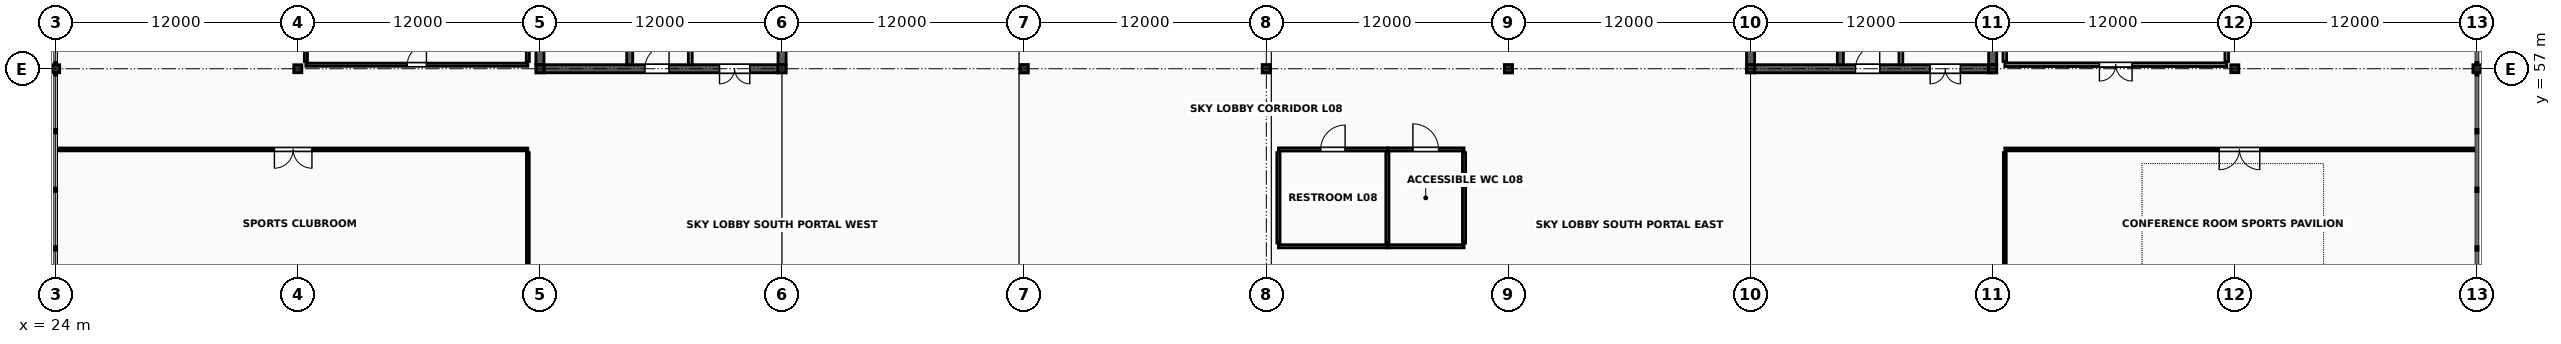
"""IFC4 building model, lengths in metres.
Left out: names, types, materials, properties, quantities, classifications, styles, units other than length and angle.
Written with IfcOpenShell. Run it as: python <this file> out.ifc"""

import sys

from ifc_helpers import new_model, si_unit, direction, frame, frame_2d, origin, origin_2d, place, context, subcontext, project, spatial, rectangle, i_section, extrude, element, fill, save


model = new_model("IFC4")
c1 = context("Model", 3, precision=1e-05, world=origin(), true_north=direction((0.0, 1.0)))
c2 = subcontext(c1, "Body", "Model", "MODEL_VIEW")
j1 = project(units=[si_unit("LENGTHUNIT", "METRE"), si_unit("PLANEANGLEUNIT", "RADIAN")], contexts=[c1])
p1 = place(None, origin())
s1 = spatial("IfcSite", under=j1, at=p1, CompositionType="ELEMENT")
p2 = place(p1, origin())
s2 = spatial("IfcBuilding", under=s1, at=p2, CompositionType="ELEMENT")
p3 = place(p2, frame((0.0, 0.0, 32.4)))
s3 = spatial("IfcBuildingStorey", under=s2, at=p3, CompositionType="ELEMENT", Elevation=32.4)
for number, where, z_axis, x_axis in (
    (1, (24.0, 57.0, 0.0), (0.0, 0.0, 1.0), (1.0, 0.0, 0.0)),
    (2, (36.0, 57.0, 0.0), (0.0, 0.0, 1.0), (1.0, 0.0, 0.0)),
):
    element("IfcColumn", number, at=place(p3, frame(where, z_axis=z_axis, x_axis=x_axis)), inside=s3, PredefinedType="COLUMN", context=c2, shape_type="SweptSolid", body=[
        extrude(i_section(OverallWidth=0.399, OverallDepth=0.393, WebThickness=0.023, FlangeThickness=0.037, FilletRadius=0.018, at=origin_2d()), origin(), (0.0, 0.0, 1.0), 5.2),
    ])
for number, where, z_axis, x_axis in (
    (3, (48.0, 57.0, 0.0), (0.0, 0.0, 1.0), (1.0, 0.0, 0.0)),
    (4, (60.0, 57.0, 0.0), (0.0, 0.0, 1.0), (1.0, 0.0, 0.0)),
    (5, (72.0, 57.0, 0.0), (0.0, 0.0, 1.0), (1.0, 0.0, 0.0)),
    (6, (84.0, 57.0, 0.0), (0.0, 0.0, 1.0), (1.0, 0.0, 0.0)),
    (7, (96.0, 57.0, 0.0), (0.0, 0.0, 1.0), (1.0, 0.0, 0.0)),
    (8, (108.0, 57.0, 0.0), (0.0, 0.0, 1.0), (1.0, 0.0, 0.0)),
    (9, (120.0, 57.0, 0.0), (0.0, 0.0, 1.0), (1.0, 0.0, 0.0)),
):
    element("IfcColumn", number, at=place(p3, frame(where, z_axis=z_axis, x_axis=x_axis)), inside=s3, PredefinedType="COLUMN", context=c2, shape_type="SweptSolid", body=[
        extrude(i_section(OverallWidth=0.406, OverallDepth=0.416, WebThickness=0.03, FlangeThickness=0.048, FilletRadius=0.018, at=origin_2d()), origin(), (0.0, 0.0, 1.0), 5.2),
    ])
for number, where, z_axis, x_axis in (
    (10, (132.0, 57.0, 0.0), (0.0, 0.0, 1.0), (1.0, 0.0, 0.0)),
    (11, (144.0, 57.0, 0.0), (0.0, 0.0, 1.0), (1.0, 0.0, 0.0)),
):
    element("IfcColumn", number, at=place(p3, frame(where, z_axis=z_axis, x_axis=x_axis)), inside=s3, PredefinedType="COLUMN", context=c2, shape_type="SweptSolid", body=[
        extrude(i_section(OverallWidth=0.399, OverallDepth=0.393, WebThickness=0.023, FlangeThickness=0.037, FilletRadius=0.018, at=origin_2d()), origin(), (0.0, 0.0, 1.0), 5.2),
    ])
p4 = place(p3, frame((48.2, 57.0, 0.0), z_axis=(0.0, 0.0, 1.0), x_axis=(1.0, 0.0, 0.0)))
e12 = element("IfcWall", 12, at=p4, inside=s3, PredefinedType="SHEAR", context=c2, shape_type="SweptSolid", body=[
    extrude(rectangle(XDim=11.6, YDim=0.4, at=frame_2d((5.8, 0.0))), origin(), (0.0, 0.0, 1.0), 5.043),
])
p5 = place(p4, frame((5.0, 0.0, 0.0)))
e13 = element("IfcOpeningElement", 13, at=p5, cuts=e12, PredefinedType="OPENING", context=c2, shape_type="SweptSolid", body=[
    extrude(rectangle(XDim=1.2, YDim=2.2, at=frame_2d((0.6, 1.1))), frame((0.0, 0.215, 0.0), z_axis=(0.0, -1.0, 0.0), x_axis=(1.0, 0.0, 0.0)), (0.0, 0.0, 1.0), 0.43),
])
p6 = place(p4, frame((8.7, 0.0, 0.0)))
e14 = element("IfcOpeningElement", 14, at=p6, cuts=e12, PredefinedType="OPENING", context=c2, shape_type="SweptSolid", body=[
    extrude(rectangle(XDim=1.5, YDim=2.25, at=frame_2d((0.75, 1.125))), frame((0.0, 0.215, 0.0), z_axis=(0.0, -1.0, 0.0), x_axis=(1.0, 0.0, 0.0)), (0.0, 0.0, 1.0), 0.43),
])
for number, where, z_axis, x_axis in (
    (15, (48.0, 57.205, 0.0), (0.0, 0.0, 1.0), (0.0, 1.0, 0.0)),
    (16, (60.0, 57.205, 0.0), (0.0, 0.0, 1.0), (0.0, 1.0, 0.0)),
):
    element("IfcWall", number, at=place(p3, frame(where, z_axis=z_axis, x_axis=x_axis)), inside=s3, PredefinedType="SHEAR", context=c2, shape_type="SweptSolid", body=[
        extrude(rectangle(XDim=11.59, YDim=0.4, at=frame_2d((5.795, 0.0))), origin(), (0.0, 0.0, 1.0), 5.043),
    ])
p7 = place(p3, frame((52.45, 57.197, 0.0), z_axis=(0.0, 0.0, 1.0), x_axis=(0.0, 1.0, 0.0)))
e17 = element("IfcWall", 17, at=p7, inside=s3, PredefinedType="SHEAR", context=c2, shape_type="SweptSolid", body=[
    extrude(rectangle(XDim=11.606, YDim=0.3, at=frame_2d((5.803, 0.0))), origin(), (0.0, 0.0, 1.0), 5.043),
])
p8 = place(p7, frame((0.9, 0.0, 0.0)))
e18 = element("IfcOpeningElement", 18, at=p8, cuts=e17, PredefinedType="OPENING", context=c2, shape_type="SweptSolid", body=[
    extrude(rectangle(XDim=1.1, YDim=2.2, at=frame_2d((0.55, 1.1))), frame((0.0, 0.165, 0.0), z_axis=(0.0, -1.0, 0.0), x_axis=(1.0, 0.0, 0.0)), (0.0, 0.0, 1.0), 0.33),
])
p9 = place(p3, frame((55.45, 57.2, 0.0), z_axis=(0.0, 0.0, 1.0), x_axis=(0.0, 1.0, 0.0)))
e19 = element("IfcWall", 19, at=p9, inside=s3, PredefinedType="SOLIDWALL", context=c2, shape_type="SweptSolid", body=[
    extrude(rectangle(XDim=8.48, YDim=0.19, at=frame_2d((4.24, 0.0))), origin(), (0.0, 0.0, 1.0), 5.033),
])
p10 = place(p9, frame((3.6, 0.0, 0.0)))
e20 = element("IfcOpeningElement", 20, at=p10, cuts=e19, PredefinedType="OPENING", context=c2, shape_type="SweptSolid", body=[
    extrude(rectangle(XDim=1.04, YDim=2.18, at=frame_2d((0.52, 1.09))), frame((0.0, 0.11, 0.0), z_axis=(0.0, -1.0, 0.0), x_axis=(1.0, 0.0, 0.0)), (0.0, 0.0, 1.0), 0.22),
])
p11 = place(p3, frame((108.2, 57.0, 0.0), z_axis=(0.0, 0.0, 1.0), x_axis=(1.0, 0.0, 0.0)))
e21 = element("IfcWall", 21, at=p11, inside=s3, PredefinedType="SHEAR", context=c2, shape_type="SweptSolid", body=[
    extrude(rectangle(XDim=11.6, YDim=0.4, at=frame_2d((5.8, 0.0))), origin(), (0.0, 0.0, 1.0), 5.043),
])
p12 = place(p11, frame((5.0, 0.0, 0.0)))
e22 = element("IfcOpeningElement", 22, at=p12, cuts=e21, PredefinedType="OPENING", context=c2, shape_type="SweptSolid", body=[
    extrude(rectangle(XDim=1.2, YDim=2.2, at=frame_2d((0.6, 1.1))), frame((0.0, 0.215, 0.0), z_axis=(0.0, -1.0, 0.0), x_axis=(1.0, 0.0, 0.0)), (0.0, 0.0, 1.0), 0.43),
])
p13 = place(p11, frame((8.7, 0.0, 0.0)))
e23 = element("IfcOpeningElement", 23, at=p13, cuts=e21, PredefinedType="OPENING", context=c2, shape_type="SweptSolid", body=[
    extrude(rectangle(XDim=1.5, YDim=2.25, at=frame_2d((0.75, 1.125))), frame((0.0, 0.215, 0.0), z_axis=(0.0, -1.0, 0.0), x_axis=(1.0, 0.0, 0.0)), (0.0, 0.0, 1.0), 0.43),
])
for number, where, z_axis, x_axis in (
    (24, (108.0, 57.205, 0.0), (0.0, 0.0, 1.0), (0.0, 1.0, 0.0)),
    (25, (120.0, 57.205, 0.0), (0.0, 0.0, 1.0), (0.0, 1.0, 0.0)),
):
    element("IfcWall", number, at=place(p3, frame(where, z_axis=z_axis, x_axis=x_axis)), inside=s3, PredefinedType="SHEAR", context=c2, shape_type="SweptSolid", body=[
        extrude(rectangle(XDim=11.59, YDim=0.4, at=frame_2d((5.795, 0.0))), origin(), (0.0, 0.0, 1.0), 5.043),
    ])
p14 = place(p3, frame((112.45, 57.197, 0.0), z_axis=(0.0, 0.0, 1.0), x_axis=(0.0, 1.0, 0.0)))
e26 = element("IfcWall", 26, at=p14, inside=s3, PredefinedType="SHEAR", context=c2, shape_type="SweptSolid", body=[
    extrude(rectangle(XDim=11.606, YDim=0.3, at=frame_2d((5.803, 0.0))), origin(), (0.0, 0.0, 1.0), 5.043),
])
p15 = place(p14, frame((0.9, 0.0, 0.0)))
e27 = element("IfcOpeningElement", 27, at=p15, cuts=e26, PredefinedType="OPENING", context=c2, shape_type="SweptSolid", body=[
    extrude(rectangle(XDim=1.1, YDim=2.2, at=frame_2d((0.55, 1.1))), frame((0.0, 0.165, 0.0), z_axis=(0.0, -1.0, 0.0), x_axis=(1.0, 0.0, 0.0)), (0.0, 0.0, 1.0), 0.33),
])
p16 = place(p3, frame((115.45, 57.2, 0.0), z_axis=(0.0, 0.0, 1.0), x_axis=(0.0, 1.0, 0.0)))
e28 = element("IfcWall", 28, at=p16, inside=s3, PredefinedType="SOLIDWALL", context=c2, shape_type="SweptSolid", body=[
    extrude(rectangle(XDim=8.48, YDim=0.19, at=frame_2d((4.24, 0.0))), origin(), (0.0, 0.0, 1.0), 5.033),
])
p17 = place(p16, frame((3.6, 0.0, 0.0)))
e29 = element("IfcOpeningElement", 29, at=p17, cuts=e28, PredefinedType="OPENING", context=c2, shape_type="SweptSolid", body=[
    extrude(rectangle(XDim=1.04, YDim=2.18, at=frame_2d((0.52, 1.09))), frame((0.0, 0.11, 0.0), z_axis=(0.0, -1.0, 0.0), x_axis=(1.0, 0.0, 0.0)), (0.0, 0.0, 1.0), 0.22),
])
p18 = place(p3, frame((24.14, 53.0, 0.0), z_axis=(0.0, 0.0, 1.0), x_axis=(1.0, 0.0, 0.0)))
e30 = element("IfcWall", 30, at=p18, inside=s3, PredefinedType="PARTITIONING", context=c2, shape_type="SweptSolid", body=[
    extrude(rectangle(XDim=23.26, YDim=0.14, at=frame_2d((11.63, 0.0))), origin(), (0.0, 0.0, 1.0), 2.88),
])
p19 = place(p18, frame((10.7, 0.0, 0.0)))
e31 = element("IfcOpeningElement", 31, at=p19, cuts=e30, PredefinedType="OPENING", context=c2, shape_type="SweptSolid", body=[
    extrude(rectangle(XDim=1.86, YDim=2.41, at=frame_2d((0.93, 1.205))), frame((0.0, 0.085, 0.0), z_axis=(0.0, -1.0, 0.0), x_axis=(1.0, 0.0, 0.0)), (0.0, 0.0, 1.0), 0.17),
])
p20 = place(p3, frame((47.4, 45.14, 0.0), z_axis=(0.0, 0.0, 1.0), x_axis=(0.0, 1.0, 0.0)))
e32 = element("IfcWall", 32, at=p20, inside=s3, PredefinedType="PARTITIONING", context=c2, shape_type="SweptSolid", body=[
    extrude(rectangle(XDim=7.7, YDim=0.14, at=frame_2d((3.85, 0.0))), origin(), (0.0, 0.0, 1.0), 2.88),
])
p21 = place(p3, frame((36.4, 57.2, 0.0), z_axis=(0.0, 0.0, 1.0), x_axis=(1.0, 0.0, 0.0)))
e33 = element("IfcWall", 33, at=p21, inside=s3, PredefinedType="PLUMBINGWALL", context=c2, shape_type="SweptSolid", body=[
    extrude(rectangle(XDim=11.0, YDim=0.155, at=frame_2d((5.5, 0.0))), origin(), (0.0, 0.0, 1.0), 2.88),
])
p22 = place(p21, frame((5.025, 0.0, 0.0)))
e34 = element("IfcOpeningElement", 34, at=p22, cuts=e33, PredefinedType="OPENING", context=c2, shape_type="SweptSolid", body=[
    extrude(rectangle(XDim=0.95, YDim=2.13, at=frame_2d((0.475, 1.065))), frame((0.0, 0.093, 0.0), z_axis=(0.0, -1.0, 0.0), x_axis=(1.0, 0.0, 0.0)), (0.0, 0.0, 1.0), 0.185),
])
for number, where, z_axis, x_axis in (
    (35, (36.4, 57.36, 0.0), (0.0, 0.0, 1.0), (0.0, 1.0, 0.0)),
    (36, (47.4, 57.36, 0.0), (0.0, 0.0, 1.0), (0.0, 1.0, 0.0)),
):
    element("IfcWall", number, at=place(p3, frame(where, z_axis=z_axis, x_axis=x_axis)), inside=s3, PredefinedType="PLUMBINGWALL", context=c2, shape_type="SweptSolid", body=[
        extrude(rectangle(XDim=11.5, YDim=0.155, at=frame_2d((5.75, 0.0))), origin(), (0.0, 0.0, 1.0), 2.88),
    ])
p23 = place(p3, frame((120.6, 57.2, 0.0), z_axis=(0.0, 0.0, 1.0), x_axis=(1.0, 0.0, 0.0)))
e37 = element("IfcWall", 37, at=p23, inside=s3, PredefinedType="SOLIDWALL", context=c2, shape_type="SweptSolid", body=[
    extrude(rectangle(XDim=11.0, YDim=0.18, at=frame_2d((5.5, 0.0))), origin(), (0.0, 0.0, 1.0), 2.88),
])
p24 = place(p23, frame((4.69, 0.0, 0.0)))
e38 = element("IfcOpeningElement", 38, at=p24, cuts=e37, PredefinedType="OPENING", context=c2, shape_type="SweptSolid", body=[
    extrude(rectangle(XDim=1.62, YDim=2.3, at=frame_2d((0.81, 1.15))), frame((0.0, 0.105, 0.0), z_axis=(0.0, -1.0, 0.0), x_axis=(1.0, 0.0, 0.0)), (0.0, 0.0, 1.0), 0.21),
])
for number, where, z_axis, x_axis in (
    (39, (120.6, 57.36, 0.0), (0.0, 0.0, 1.0), (0.0, 1.0, 0.0)),
    (40, (131.6, 57.36, 0.0), (0.0, 0.0, 1.0), (0.0, 1.0, 0.0)),
):
    element("IfcWall", number, at=place(p3, frame(where, z_axis=z_axis, x_axis=x_axis)), inside=s3, PredefinedType="SOLIDWALL", context=c2, shape_type="SweptSolid", body=[
        extrude(rectangle(XDim=11.5, YDim=0.18, at=frame_2d((5.75, 0.0))), origin(), (0.0, 0.0, 1.0), 2.88),
    ])
p25 = place(p3, frame((120.6, 53.0, 0.0), z_axis=(0.0, 0.0, 1.0), x_axis=(1.0, 0.0, 0.0)))
e41 = element("IfcWall", 41, at=p25, inside=s3, PredefinedType="PARTITIONING", context=c2, shape_type="SweptSolid", body=[
    extrude(rectangle(XDim=23.26, YDim=0.14, at=frame_2d((11.63, 0.0))), origin(), (0.0, 0.0, 1.0), 2.88),
])
p26 = place(p25, frame((10.625, 0.0, 0.0)))
e42 = element("IfcOpeningElement", 42, at=p26, cuts=e41, PredefinedType="OPENING", context=c2, shape_type="SweptSolid", body=[
    extrude(rectangle(XDim=2.01, YDim=2.45, at=frame_2d((1.005, 1.225))), frame((0.0, 0.085, 0.0), z_axis=(0.0, -1.0, 0.0), x_axis=(1.0, 0.0, 0.0)), (0.0, 0.0, 1.0), 0.17),
])
p27 = place(p3, frame((120.6, 45.14, 0.0), z_axis=(0.0, 0.0, 1.0), x_axis=(0.0, 1.0, 0.0)))
e43 = element("IfcWall", 43, at=p27, inside=s3, PredefinedType="PARTITIONING", context=c2, shape_type="SweptSolid", body=[
    extrude(rectangle(XDim=7.7, YDim=0.14, at=frame_2d((3.85, 0.0))), origin(), (0.0, 0.0, 1.0), 2.88),
])
p28 = place(p3, frame((84.6, 48.2, 0.0), z_axis=(0.0, 0.0, 1.0), x_axis=(1.0, 0.0, 0.0)))
e44 = element("IfcWall", 44, at=p28, inside=s3, PredefinedType="PLUMBINGWALL", context=c2, shape_type="SweptSolid", body=[
    extrude(rectangle(XDim=5.4, YDim=0.155, at=frame_2d((2.7, 0.0))), origin(), (0.0, 0.0, 1.0), 2.88),
])
p29 = place(p3, frame((84.6, 53.0, 0.0), z_axis=(0.0, 0.0, 1.0), x_axis=(1.0, 0.0, 0.0)))
e45 = element("IfcWall", 45, at=p29, inside=s3, PredefinedType="PLUMBINGWALL", context=c2, shape_type="SweptSolid", body=[
    extrude(rectangle(XDim=5.4, YDim=0.155, at=frame_2d((2.7, 0.0))), origin(), (0.0, 0.0, 1.0), 2.88),
])
p30 = place(p29, frame((2.095, 0.0, 0.0)))
e46 = element("IfcOpeningElement", 46, at=p30, cuts=e45, PredefinedType="OPENING", context=c2, shape_type="SweptSolid", body=[
    extrude(rectangle(XDim=1.21, YDim=2.25, at=frame_2d((0.605, 1.125))), frame((0.0, 0.093, 0.0), z_axis=(0.0, -1.0, 0.0), x_axis=(1.0, 0.0, 0.0)), (0.0, 0.0, 1.0), 0.185),
])
for number, where, z_axis, x_axis in (
    (47, (84.6, 48.36, 0.0), (0.0, 0.0, 1.0), (0.0, 1.0, 0.0)),
    (48, (90.0, 48.36, 0.0), (0.0, 0.0, 1.0), (0.0, 1.0, 0.0)),
):
    element("IfcWall", number, at=place(p3, frame(where, z_axis=z_axis, x_axis=x_axis)), inside=s3, PredefinedType="PLUMBINGWALL", context=c2, shape_type="SweptSolid", body=[
        extrude(rectangle(XDim=4.48, YDim=0.155, at=frame_2d((2.24, 0.0))), origin(), (0.0, 0.0, 1.0), 2.88),
    ])
p31 = place(p3, frame((90.0, 48.2, 0.0), z_axis=(0.0, 0.0, 1.0), x_axis=(1.0, 0.0, 0.0)))
e49 = element("IfcWall", 49, at=p31, inside=s3, PredefinedType="PLUMBINGWALL", context=c2, shape_type="SweptSolid", body=[
    extrude(rectangle(XDim=3.8, YDim=0.155, at=frame_2d((1.9, 0.0))), origin(), (0.0, 0.0, 1.0), 2.88),
])
p32 = place(p3, frame((90.0, 53.0, 0.0), z_axis=(0.0, 0.0, 1.0), x_axis=(1.0, 0.0, 0.0)))
e50 = element("IfcWall", 50, at=p32, inside=s3, PredefinedType="PLUMBINGWALL", context=c2, shape_type="SweptSolid", body=[
    extrude(rectangle(XDim=3.8, YDim=0.155, at=frame_2d((1.9, 0.0))), origin(), (0.0, 0.0, 1.0), 2.88),
])
p33 = place(p32, frame((1.265, 0.0, 0.0)))
e51 = element("IfcOpeningElement", 51, at=p33, cuts=e50, PredefinedType="OPENING", context=c2, shape_type="SweptSolid", body=[
    extrude(rectangle(XDim=1.27, YDim=2.27, at=frame_2d((0.635, 1.135))), frame((0.0, 0.093, 0.0), z_axis=(0.0, -1.0, 0.0), x_axis=(1.0, 0.0, 0.0)), (0.0, 0.0, 1.0), 0.185),
])
p34 = place(p3, frame((93.8, 48.36, 0.0), z_axis=(0.0, 0.0, 1.0), x_axis=(0.0, 1.0, 0.0)))
e52 = element("IfcWall", 52, at=p34, inside=s3, PredefinedType="PLUMBINGWALL", context=c2, shape_type="SweptSolid", body=[
    extrude(rectangle(XDim=4.48, YDim=0.155, at=frame_2d((2.24, 0.0))), origin(), (0.0, 0.0, 1.0), 2.88),
])
p35 = place(p5, origin())
e53 = element("IfcDoor", 53, at=p35, inside=s3, OperationType="SINGLE_SWING_RIGHT", PredefinedType="DOOR", context=c2, shape_type="SweptSolid", body=[
    extrude(rectangle(XDim=1.2, YDim=2.2, at=frame_2d((0.6, 1.1))), frame((0.0, 0.025, 0.0), z_axis=(0.0, -1.0, 0.0), x_axis=(1.0, 0.0, 0.0)), (0.0, 0.0, 1.0), 0.05),
])
fill(e13, e53)
p36 = place(p6, origin())
e54 = element("IfcDoor", 54, at=p36, inside=s3, OperationType="DOUBLE_DOOR_SINGLE_SWING", PredefinedType="DOOR", context=c2, shape_type="SweptSolid", body=[
    extrude(rectangle(XDim=1.5, YDim=2.25, at=frame_2d((0.75, 1.125))), frame((0.0, 0.025, 0.0), z_axis=(0.0, -1.0, 0.0), x_axis=(1.0, 0.0, 0.0)), (0.0, 0.0, 1.0), 0.05),
])
fill(e14, e54)
p37 = place(p12, origin())
e55 = element("IfcDoor", 55, at=p37, inside=s3, OperationType="SINGLE_SWING_RIGHT", PredefinedType="DOOR", context=c2, shape_type="SweptSolid", body=[
    extrude(rectangle(XDim=1.2, YDim=2.2, at=frame_2d((0.6, 1.1))), frame((0.0, 0.025, 0.0), z_axis=(0.0, -1.0, 0.0), x_axis=(1.0, 0.0, 0.0)), (0.0, 0.0, 1.0), 0.05),
])
fill(e22, e55)
p38 = place(p13, origin())
e56 = element("IfcDoor", 56, at=p38, inside=s3, OperationType="DOUBLE_DOOR_SINGLE_SWING", PredefinedType="DOOR", context=c2, shape_type="SweptSolid", body=[
    extrude(rectangle(XDim=1.5, YDim=2.25, at=frame_2d((0.75, 1.125))), frame((0.0, 0.025, 0.0), z_axis=(0.0, -1.0, 0.0), x_axis=(1.0, 0.0, 0.0)), (0.0, 0.0, 1.0), 0.05),
])
fill(e23, e56)
p39 = place(p19, origin())
e57 = element("IfcDoor", 57, at=p39, inside=s3, OperationType="DOUBLE_DOOR_SINGLE_SWING", PredefinedType="DOOR", context=c2, shape_type="SweptSolid", body=[
    extrude(rectangle(XDim=1.86, YDim=2.41, at=frame_2d((0.93, 1.205))), frame((0.0, 0.025, 0.0), z_axis=(0.0, -1.0, 0.0), x_axis=(1.0, 0.0, 0.0)), (0.0, 0.0, 1.0), 0.05),
])
fill(e31, e57)
p40 = place(p22, origin())
e58 = element("IfcDoor", 58, at=p40, inside=s3, OperationType="SINGLE_SWING_RIGHT", PredefinedType="DOOR", context=c2, shape_type="SweptSolid", body=[
    extrude(rectangle(XDim=0.95, YDim=2.13, at=frame_2d((0.475, 1.065))), frame((0.0, 0.025, 0.0), z_axis=(0.0, -1.0, 0.0), x_axis=(1.0, 0.0, 0.0)), (0.0, 0.0, 1.0), 0.05),
])
fill(e34, e58)
p41 = place(p24, origin())
e59 = element("IfcDoor", 59, at=p41, inside=s3, OperationType="DOUBLE_DOOR_SINGLE_SWING", PredefinedType="DOOR", context=c2, shape_type="SweptSolid", body=[
    extrude(rectangle(XDim=1.62, YDim=2.3, at=frame_2d((0.81, 1.15))), frame((0.0, 0.025, 0.0), z_axis=(0.0, -1.0, 0.0), x_axis=(1.0, 0.0, 0.0)), (0.0, 0.0, 1.0), 0.05),
])
fill(e38, e59)
p42 = place(p26, origin())
e60 = element("IfcDoor", 60, at=p42, inside=s3, OperationType="DOUBLE_DOOR_SINGLE_SWING", PredefinedType="DOOR", context=c2, shape_type="SweptSolid", body=[
    extrude(rectangle(XDim=2.01, YDim=2.45, at=frame_2d((1.005, 1.225))), frame((0.0, 0.025, 0.0), z_axis=(0.0, -1.0, 0.0), x_axis=(1.0, 0.0, 0.0)), (0.0, 0.0, 1.0), 0.05),
])
fill(e42, e60)
p43 = place(p30, origin())
e61 = element("IfcDoor", 61, at=p43, inside=s3, OperationType="SINGLE_SWING_RIGHT", PredefinedType="DOOR", context=c2, shape_type="SweptSolid", body=[
    extrude(rectangle(XDim=1.21, YDim=2.25, at=frame_2d((0.605, 1.125))), frame((0.0, 0.025, 0.0), z_axis=(0.0, -1.0, 0.0), x_axis=(1.0, 0.0, 0.0)), (0.0, 0.0, 1.0), 0.05),
])
fill(e46, e61)
p44 = place(p33, origin())
e62 = element("IfcDoor", 62, at=p44, inside=s3, OperationType="SINGLE_SWING_LEFT", PredefinedType="DOOR", context=c2, shape_type="SweptSolid", body=[
    extrude(rectangle(XDim=1.27, YDim=2.27, at=frame_2d((0.635, 1.135))), frame((0.0, 0.025, 0.0), z_axis=(0.0, -1.0, 0.0), x_axis=(1.0, 0.0, 0.0)), (0.0, 0.0, 1.0), 0.05),
])
fill(e51, e62)
save(model, sys.argv[1])
